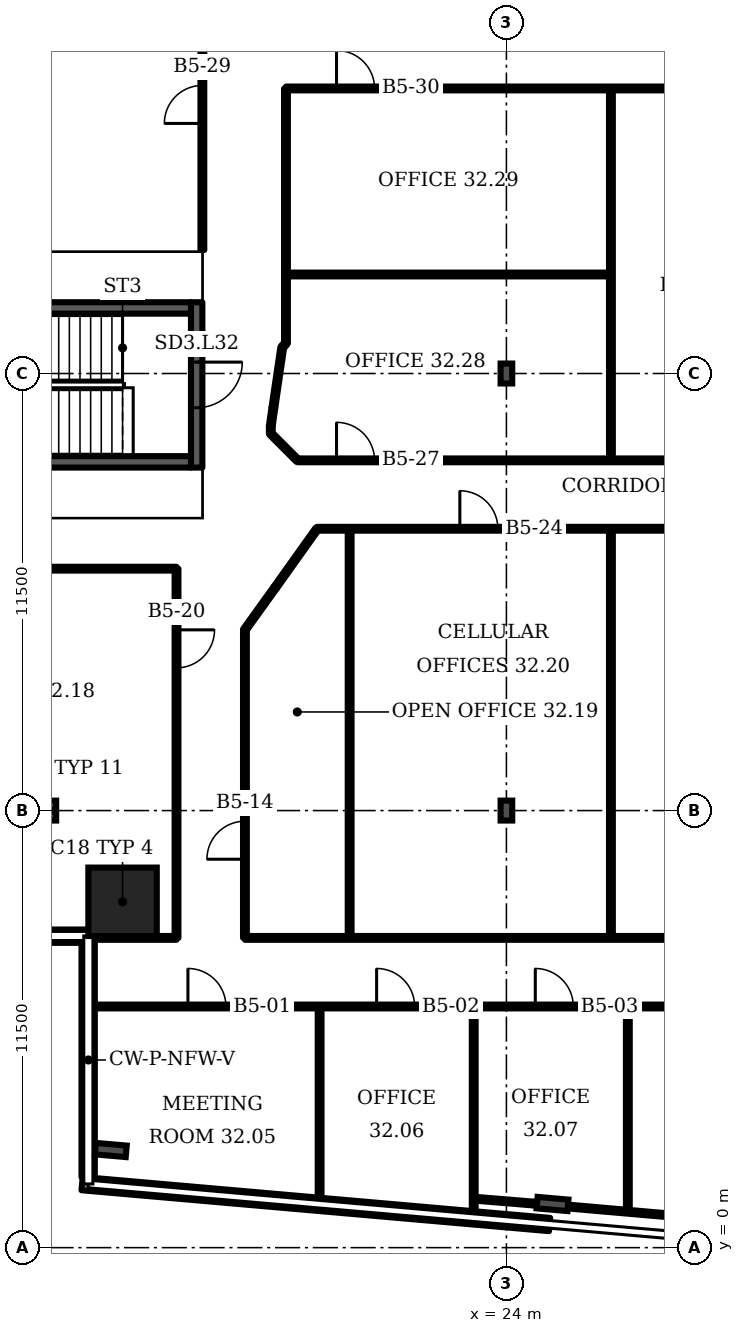
"""IFC4 building model, lengths in metres.
Left out: names, types, materials, properties, quantities, classifications, styles, units other than length and angle.
Written with IfcOpenShell. Run it as: python <this file> out.ifc"""

import sys

from ifc_helpers import new_model, si_unit, direction, frame, frame_2d, origin, origin_2d, place, context, subcontext, project, spatial, rectangle, i_section, extrude, element, fill, save


model = new_model("IFC4")
c1 = context("Model", 3, precision=1e-05, world=origin(), true_north=direction((0.0, 1.0)))
c2 = subcontext(c1, "Body", "Model", "MODEL_VIEW")
j1 = project(units=[si_unit("LENGTHUNIT", "METRE"), si_unit("PLANEANGLEUNIT", "RADIAN")], contexts=[c1])
p1 = place(None, origin())
s1 = spatial("IfcSite", under=j1, at=p1, CompositionType="ELEMENT")
p2 = place(p1, origin())
s2 = spatial("IfcBuilding", under=s1, at=p2, CompositionType="ELEMENT")
p3 = place(p2, frame((0.0, 0.0, 136.3)))
s3 = spatial("IfcBuildingStorey", under=s2, at=p3, CompositionType="ELEMENT", Elevation=136.3)
p4 = place(p3, frame((13.9, 9.1, 0.0), z_axis=(0.0, 0.0, 1.0), x_axis=(1.0, 0.0, 0.0)))
e1 = element("IfcColumn", 1, at=p4, inside=s3, PredefinedType="COLUMN", context=c2, shape_type="SweptSolid", body=[
    extrude(rectangle(XDim=1.8, YDim=1.8, at=origin_2d()), origin(), (0.0, 0.0, 1.0), 3.6),
])
for number, where, z_axis, x_axis in (
    (2, (13.591, 2.569, 0.0), (0.0, 0.0, 1.0), (-0.087, -0.996, 0.0)),
    (3, (25.214, 1.149, 0.0), (0.0, 0.0, 1.0), (-0.087, -0.996, 0.0)),
):
    element("IfcColumn", number, at=place(p3, frame(where, z_axis=z_axis, x_axis=x_axis)), inside=s3, PredefinedType="COLUMN", context=c2, shape_type="SweptSolid", body=[
        extrude(i_section(OverallWidth=0.303, OverallDepth=0.814, WebThickness=0.021, FlangeThickness=0.04, FilletRadius=0.03, at=origin_2d()), origin(), (0.0, 0.0, 1.0), 3.6),
    ])
for number, where, z_axis, x_axis in (
    (4, (12.0, 11.5, 0.0), (0.0, 0.0, 1.0), (1.0, 0.0, 0.0)),
    (5, (24.0, 11.5, 0.0), (0.0, 0.0, 1.0), (1.0, 0.0, 0.0)),
    (6, (24.0, 23.0, 0.0), (0.0, 0.0, 1.0), (1.0, 0.0, 0.0)),
):
    element("IfcColumn", number, at=place(p3, frame(where, z_axis=z_axis, x_axis=x_axis)), inside=s3, PredefinedType="COLUMN", context=c2, shape_type="SweptSolid", body=[
        extrude(i_section(OverallWidth=0.306, OverallDepth=0.524, WebThickness=0.021, FlangeThickness=0.04, FilletRadius=0.027, at=origin_2d()), origin(), (0.0, 0.0, 1.0), 3.6),
    ])
p5 = place(p3, frame((12.835, 1.685, 0.0), z_axis=(0.0, 0.0, 1.0), x_axis=(0.996192, -0.087173, 0.0)))
e7 = element("IfcWall", 7, at=p5, inside=s3, PredefinedType="SOLIDWALL", context=c2, shape_type="SweptSolid", body=[
    extrude(rectangle(XDim=12.348, YDim=0.35, at=frame_2d((6.174, 0.0))), origin(), (0.0, 0.0, 1.0), 1.0),
])
p6 = place(p3, frame((9.036, 8.195, 0.0), z_axis=(0.0, 0.0, 1.0), x_axis=(1.0, 0.0, 0.0)))
e8 = element("IfcWall", 8, at=p6, inside=s3, PredefinedType="SOLIDWALL", context=c2, shape_type="SweptSolid", body=[
    extrude(rectangle(XDim=3.964, YDim=0.35, at=frame_2d((1.982, 0.0))), origin(), (0.0, 0.0, 1.0), 1.0),
])
p7 = place(p3, frame((12.995, 8.02, 0.0), z_axis=(0.0, 0.0, 1.0), x_axis=(0.0, -1.0, 0.0)))
e9 = element("IfcWall", 9, at=p7, inside=s3, PredefinedType="SOLIDWALL", context=c2, shape_type="SweptSolid", body=[
    extrude(rectangle(XDim=6.161, YDim=0.35, at=frame_2d((3.081, 0.0))), origin(), (0.0, 0.0, 1.0), 1.0),
])
p8 = place(p3, frame((15.85, 20.525, 0.0), z_axis=(0.0, 0.0, 1.0), x_axis=(0.0, 1.0, 0.0)))
e10 = element("IfcWall", 10, at=p8, inside=s3, PredefinedType="SHEAR", context=c2, shape_type="SweptSolid", body=[
    extrude(rectangle(XDim=4.35, YDim=0.3, at=frame_2d((2.175, 0.0))), origin(), (0.0, 0.0, 1.0), 3.2),
])
p9 = place(p8, frame((1.575, 0.0, 0.0)))
e11 = element("IfcOpeningElement", 11, at=p9, cuts=e10, PredefinedType="OPENING", context=c2, shape_type="SweptSolid", body=[
    extrude(rectangle(XDim=1.2, YDim=2.1, at=frame_2d((0.6, 1.05))), frame((0.0, 0.16, 0.0), z_axis=(0.0, -1.0, 0.0), x_axis=(1.0, 0.0, 0.0)), (0.0, 0.0, 1.0), 0.32),
])
p10 = place(p3, frame((7.51, 17.865, 0.0), z_axis=(0.0, 0.0, 1.0), x_axis=(1.0, 0.0, 0.0)))
e12 = element("IfcWall", 12, at=p10, inside=s3, PredefinedType="PARTITIONING", context=c2, shape_type="SweptSolid", body=[
    extrude(rectangle(XDim=7.81, YDim=0.1, at=frame_2d((3.905, 0.0))), origin(), (0.0, 0.0, 1.0), 3.2),
])
p11 = place(p3, frame((13.02, 6.345, 0.0), z_axis=(0.0, 0.0, 1.0), x_axis=(1.0, 0.0, 0.0)))
e13 = element("IfcWall", 13, at=p11, inside=s3, PredefinedType="PARTITIONING", context=c2, shape_type="SweptSolid", body=[
    extrude(rectangle(XDim=28.165, YDim=0.1, at=frame_2d((14.083, 0.0))), origin(), (0.0, 0.0, 1.0), 3.2),
])
p12 = place(p11, frame((2.6, 0.0, 0.0)))
e14 = element("IfcOpeningElement", 14, at=p12, cuts=e13, PredefinedType="OPENING", context=c2, shape_type="SweptSolid", body=[
    extrude(rectangle(XDim=1.0, YDim=2.1, at=frame_2d((0.5, 1.05))), frame((0.0, 0.06, 0.0), z_axis=(0.0, -1.0, 0.0), x_axis=(1.0, 0.0, 0.0)), (0.0, 0.0, 1.0), 0.12),
])
p13 = place(p11, frame((7.565, 0.0, 0.0)))
e15 = element("IfcOpeningElement", 15, at=p13, cuts=e13, PredefinedType="OPENING", context=c2, shape_type="SweptSolid", body=[
    extrude(rectangle(XDim=1.0, YDim=2.1, at=frame_2d((0.5, 1.05))), frame((0.0, 0.06, 0.0), z_axis=(0.0, -1.0, 0.0), x_axis=(1.0, 0.0, 0.0)), (0.0, 0.0, 1.0), 0.12),
])
p14 = place(p11, frame((11.74, 0.0, 0.0)))
e16 = element("IfcOpeningElement", 16, at=p14, cuts=e13, PredefinedType="OPENING", context=c2, shape_type="SweptSolid", body=[
    extrude(rectangle(XDim=1.0, YDim=2.1, at=frame_2d((0.5, 1.05))), frame((0.0, 0.06, 0.0), z_axis=(0.0, -1.0, 0.0), x_axis=(1.0, 0.0, 0.0)), (0.0, 0.0, 1.0), 0.12),
])
p15 = place(p11, frame((15.795, 0.0, 0.0)))
e17 = element("IfcOpeningElement", 17, at=p15, cuts=e13, PredefinedType="OPENING", context=c2, shape_type="SweptSolid", body=[
    extrude(rectangle(XDim=1.0, YDim=2.1, at=frame_2d((0.5, 1.05))), frame((0.0, 0.06, 0.0), z_axis=(0.0, -1.0, 0.0), x_axis=(1.0, 0.0, 0.0)), (0.0, 0.0, 1.0), 0.12),
])
p16 = place(p11, frame((19.65, 0.0, 0.0)))
e18 = element("IfcOpeningElement", 18, at=p16, cuts=e13, PredefinedType="OPENING", context=c2, shape_type="SweptSolid", body=[
    extrude(rectangle(XDim=1.0, YDim=2.1, at=frame_2d((0.5, 1.05))), frame((0.0, 0.06, 0.0), z_axis=(0.0, -1.0, 0.0), x_axis=(1.0, 0.0, 0.0)), (0.0, 0.0, 1.0), 0.12),
])
p17 = place(p11, frame((23.43, 0.0, 0.0)))
e19 = element("IfcOpeningElement", 19, at=p17, cuts=e13, PredefinedType="OPENING", context=c2, shape_type="SweptSolid", body=[
    extrude(rectangle(XDim=1.0, YDim=2.1, at=frame_2d((0.5, 1.05))), frame((0.0, 0.06, 0.0), z_axis=(0.0, -1.0, 0.0), x_axis=(1.0, 0.0, 0.0)), (0.0, 0.0, 1.0), 0.12),
])
p18 = place(p3, frame((13.02, 8.15, 0.0), z_axis=(0.0, 0.0, 1.0), x_axis=(1.0, 0.0, 0.0)))
e20 = element("IfcWall", 20, at=p18, inside=s3, PredefinedType="PARTITIONING", context=c2, shape_type="SweptSolid", body=[
    extrude(rectangle(XDim=2.3, YDim=0.1, at=frame_2d((1.15, 0.0))), origin(), (0.0, 0.0, 1.0), 3.2),
])
p19 = place(p3, frame((15.32, 8.15, 0.0), z_axis=(0.0, 0.0, 1.0), x_axis=(0.0, 1.0, 0.0)))
e21 = element("IfcWall", 21, at=p19, inside=s3, PredefinedType="PARTITIONING", context=c2, shape_type="SweptSolid", body=[
    extrude(rectangle(XDim=9.715, YDim=0.1, at=frame_2d((4.857, 0.0))), origin(), (0.0, 0.0, 1.0), 3.2),
])
p20 = place(p19, frame((7.105, 0.0, 0.0)))
e22 = element("IfcOpeningElement", 22, at=p20, cuts=e21, PredefinedType="OPENING", context=c2, shape_type="SweptSolid", body=[
    extrude(rectangle(XDim=1.0, YDim=2.1, at=frame_2d((0.5, 1.05))), frame((0.0, 0.06, 0.0), z_axis=(0.0, -1.0, 0.0), x_axis=(1.0, 0.0, 0.0)), (0.0, 0.0, 1.0), 0.12),
])
p21 = place(p3, frame((16.0, 26.25, 0.0), z_axis=(0.0, 0.0, 1.0), x_axis=(0.0, 1.0, 0.0)))
e23 = element("IfcWall", 23, at=p21, inside=s3, PredefinedType="PARTITIONING", context=c2, shape_type="SweptSolid", body=[
    extrude(rectangle(XDim=7.73, YDim=0.1, at=frame_2d((3.865, 0.0))), origin(), (0.0, 0.0, 1.0), 3.2),
])
p22 = place(p21, frame((3.33, 0.0, 0.0)))
e24 = element("IfcOpeningElement", 24, at=p22, cuts=e23, PredefinedType="OPENING", context=c2, shape_type="SweptSolid", body=[
    extrude(rectangle(XDim=1.0, YDim=2.1, at=frame_2d((0.5, 1.05))), frame((0.0, 0.06, 0.0), z_axis=(0.0, -1.0, 0.0), x_axis=(1.0, 0.0, 0.0)), (0.0, 0.0, 1.0), 0.12),
])
p23 = place(p3, frame((17.12, 8.15, 0.0), z_axis=(0.0, 0.0, 1.0), x_axis=(0.0, 1.0, 0.0)))
e25 = element("IfcWall", 25, at=p23, inside=s3, PredefinedType="PARTITIONING", context=c2, shape_type="SweptSolid", body=[
    extrude(rectangle(XDim=8.11, YDim=0.1, at=frame_2d((4.055, 0.0))), origin(), (0.0, 0.0, 1.0), 3.2),
])
p24 = place(p23, frame((2.07, 0.0, 0.0)))
e26 = element("IfcOpeningElement", 26, at=p24, cuts=e25, PredefinedType="OPENING", context=c2, shape_type="SweptSolid", body=[
    extrude(rectangle(XDim=1.0, YDim=2.1, at=frame_2d((0.5, 1.05))), frame((0.0, 0.06, 0.0), z_axis=(0.0, -1.0, 0.0), x_axis=(1.0, 0.0, 0.0)), (0.0, 0.0, 1.0), 0.12),
])
p25 = place(p3, frame((17.12, 8.15, 0.0), z_axis=(0.0, 0.0, 1.0), x_axis=(1.0, 0.0, 0.0)))
e27 = element("IfcWall", 27, at=p25, inside=s3, PredefinedType="PARTITIONING", context=c2, shape_type="SweptSolid", body=[
    extrude(rectangle(XDim=24.065, YDim=0.1, at=frame_2d((12.033, 0.0))), origin(), (0.0, 0.0, 1.0), 3.2),
])
p26 = place(p3, frame((17.12, 16.26, 0.0), z_axis=(0.0, 0.0, 1.0), x_axis=(0.583811, 0.811893, 0.0)))
e28 = element("IfcWall", 28, at=p26, inside=s3, PredefinedType="PARTITIONING", context=c2, shape_type="SweptSolid", body=[
    extrude(rectangle(XDim=1.364, YDim=0.1, at=frame_2d((0.682, 0.0))), origin(), (0.0, 0.0, 1.0), 3.2),
])
p27 = place(p3, frame((17.8, 21.42, 0.0), z_axis=(0.0, 0.0, 1.0), x_axis=(0.0, 1.0, 0.0)))
e29 = element("IfcWall", 29, at=p27, inside=s3, PredefinedType="PARTITIONING", context=c2, shape_type="SweptSolid", body=[
    extrude(rectangle(XDim=0.2, YDim=0.1, at=frame_2d((0.1, 0.0))), origin(), (0.0, 0.0, 1.0), 3.2),
])
p28 = place(p3, frame((17.8, 21.62, 0.0), z_axis=(0.0, 0.0, 1.0), x_axis=(0.141559, 0.989927, 0.0)))
e30 = element("IfcWall", 30, at=p28, inside=s3, PredefinedType="PARTITIONING", context=c2, shape_type="SweptSolid", body=[
    extrude(rectangle(XDim=0.495, YDim=0.1, at=frame_2d((0.248, 0.0))), origin(), (0.0, 0.0, 1.0), 3.2),
])
p29 = place(p3, frame((17.87, 22.11, 0.0), z_axis=(0.0, 0.0, 1.0), x_axis=(0.145396, 0.989372, 0.0)))
e31 = element("IfcWall", 31, at=p29, inside=s3, PredefinedType="PARTITIONING", context=c2, shape_type="SweptSolid", body=[
    extrude(rectangle(XDim=1.582, YDim=0.1, at=frame_2d((0.791, 0.0))), origin(), (0.0, 0.0, 1.0), 3.2),
])
p30 = place(p3, frame((17.915, 17.365, 0.0), z_axis=(0.0, 0.0, 1.0), x_axis=(0.580403, 0.814333, 0.0)))
e32 = element("IfcWall", 32, at=p30, inside=s3, PredefinedType="PARTITIONING", context=c2, shape_type="SweptSolid", body=[
    extrude(rectangle(XDim=1.905, YDim=0.1, at=frame_2d((0.952, 0.0))), origin(), (0.0, 0.0, 1.0), 3.2),
])
p31 = place(p3, frame((18.1, 23.685, 0.0), z_axis=(0.0, 0.0, 1.0), x_axis=(0.65566, 0.755051, 0.0)))
e33 = element("IfcWall", 33, at=p31, inside=s3, PredefinedType="PARTITIONING", context=c2, shape_type="SweptSolid", body=[
    extrude(rectangle(XDim=0.152, YDim=0.1, at=frame_2d((0.076, 0.0))), origin(), (0.0, 0.0, 1.0), 3.2),
])
p32 = place(p3, frame((18.2, 23.8, 0.0), z_axis=(0.0, 0.0, 1.0), x_axis=(0.0, 1.0, 0.0)))
e34 = element("IfcWall", 34, at=p32, inside=s3, PredefinedType="PARTITIONING", context=c2, shape_type="SweptSolid", body=[
    extrude(rectangle(XDim=6.7, YDim=0.1, at=frame_2d((3.35, 0.0))), origin(), (0.0, 0.0, 1.0), 3.2),
])
p33 = place(p3, frame((18.2, 25.605, 0.0), z_axis=(0.0, 0.0, 1.0), x_axis=(1.0, 0.0, 0.0)))
e35 = element("IfcWall", 35, at=p33, inside=s3, PredefinedType="PARTITIONING", context=c2, shape_type="SweptSolid", body=[
    extrude(rectangle(XDim=8.55, YDim=0.1, at=frame_2d((4.275, 0.0))), origin(), (0.0, 0.0, 1.0), 3.2),
])
p34 = place(p3, frame((18.2, 30.5, 0.0), z_axis=(0.0, 0.0, 1.0), x_axis=(1.0, 0.0, 0.0)))
e36 = element("IfcWall", 36, at=p34, inside=s3, PredefinedType="PARTITIONING", context=c2, shape_type="SweptSolid", body=[
    extrude(rectangle(XDim=18.65, YDim=0.1, at=frame_2d((9.325, 0.0))), origin(), (0.0, 0.0, 1.0), 3.2),
])
p35 = place(p34, frame((1.33, 0.0, 0.0)))
e37 = element("IfcOpeningElement", 37, at=p35, cuts=e36, PredefinedType="OPENING", context=c2, shape_type="SweptSolid", body=[
    extrude(rectangle(XDim=1.0, YDim=2.1, at=frame_2d((0.5, 1.05))), frame((0.0, 0.06, 0.0), z_axis=(0.0, -1.0, 0.0), x_axis=(1.0, 0.0, 0.0)), (0.0, 0.0, 1.0), 0.12),
])
p36 = place(p34, frame((13.17, 0.0, 0.0)))
e38 = element("IfcOpeningElement", 38, at=p36, cuts=e36, PredefinedType="OPENING", context=c2, shape_type="SweptSolid", body=[
    extrude(rectangle(XDim=1.0, YDim=2.1, at=frame_2d((0.5, 1.05))), frame((0.0, 0.06, 0.0), z_axis=(0.0, -1.0, 0.0), x_axis=(1.0, 0.0, 0.0)), (0.0, 0.0, 1.0), 0.12),
])
p37 = place(p3, frame((18.505, 20.715, 0.0), z_axis=(0.0, 0.0, 1.0), x_axis=(-0.707107, 0.707107, 0.0)))
e39 = element("IfcWall", 39, at=p37, inside=s3, PredefinedType="PARTITIONING", context=c2, shape_type="SweptSolid", body=[
    extrude(rectangle(XDim=0.997, YDim=0.1, at=frame_2d((0.499, 0.0))), origin(), (0.0, 0.0, 1.0), 3.2),
])
p38 = place(p3, frame((18.505, 20.715, 0.0), z_axis=(0.0, 0.0, 1.0), x_axis=(1.0, 0.0, 0.0)))
e40 = element("IfcWall", 40, at=p38, inside=s3, PredefinedType="PARTITIONING", context=c2, shape_type="SweptSolid", body=[
    extrude(rectangle(XDim=49.385, YDim=0.1, at=frame_2d((24.692, 0.0))), origin(), (0.0, 0.0, 1.0), 3.2),
])
p39 = place(p38, frame((1.025, 0.0, 0.0)))
e41 = element("IfcOpeningElement", 41, at=p39, cuts=e40, PredefinedType="OPENING", context=c2, shape_type="SweptSolid", body=[
    extrude(rectangle(XDim=1.0, YDim=2.1, at=frame_2d((0.5, 1.05))), frame((0.0, 0.06, 0.0), z_axis=(0.0, -1.0, 0.0), x_axis=(1.0, 0.0, 0.0)), (0.0, 0.0, 1.0), 0.12),
])
p40 = place(p3, frame((19.02, 18.915, 0.0), z_axis=(0.0, 0.0, 1.0), x_axis=(1.0, 0.0, 0.0)))
e42 = element("IfcWall", 42, at=p40, inside=s3, PredefinedType="PARTITIONING", context=c2, shape_type="SweptSolid", body=[
    extrude(rectangle(XDim=22.965, YDim=0.1, at=frame_2d((11.482, 0.0))), origin(), (0.0, 0.0, 1.0), 3.2),
])
p41 = place(p40, frame((3.755, 0.0, 0.0)))
e43 = element("IfcOpeningElement", 43, at=p41, cuts=e42, PredefinedType="OPENING", context=c2, shape_type="SweptSolid", body=[
    extrude(rectangle(XDim=1.0, YDim=2.1, at=frame_2d((0.5, 1.05))), frame((0.0, 0.06, 0.0), z_axis=(0.0, -1.0, 0.0), x_axis=(1.0, 0.0, 0.0)), (0.0, 0.0, 1.0), 0.12),
])
p42 = place(p40, frame((18.95, 0.0, 0.0)))
e44 = element("IfcOpeningElement", 44, at=p42, cuts=e42, PredefinedType="OPENING", context=c2, shape_type="SweptSolid", body=[
    extrude(rectangle(XDim=1.8, YDim=2.1, at=frame_2d((0.9, 1.05))), frame((0.0, 0.06, 0.0), z_axis=(0.0, -1.0, 0.0), x_axis=(1.0, 0.0, 0.0)), (0.0, 0.0, 1.0), 0.12),
])
p43 = place(p3, frame((19.085, 1.163, 0.0), z_axis=(0.0, 0.0, 1.0), x_axis=(0.0, 1.0, 0.0)))
e45 = element("IfcWall", 45, at=p43, inside=s3, PredefinedType="PARTITIONING", context=c2, shape_type="SweptSolid", body=[
    extrude(rectangle(XDim=5.182, YDim=0.1, at=frame_2d((2.591, 0.0))), origin(), (0.0, 0.0, 1.0), 2.58),
])
p44 = place(p3, frame((19.875, 8.15, 0.0), z_axis=(0.0, 0.0, 1.0), x_axis=(0.0, 1.0, 0.0)))
e46 = element("IfcWall", 46, at=p44, inside=s3, PredefinedType="PARTITIONING", context=c2, shape_type="SweptSolid", body=[
    extrude(rectangle(XDim=10.765, YDim=0.1, at=frame_2d((5.383, 0.0))), origin(), (0.0, 0.0, 1.0), 3.2),
])
p45 = place(p3, frame((23.14, 0.825, 0.0), z_axis=(0.0, 0.0, 1.0), x_axis=(0.0, 1.0, 0.0)))
e47 = element("IfcWall", 47, at=p45, inside=s3, PredefinedType="PARTITIONING", context=c2, shape_type="SweptSolid", body=[
    extrude(rectangle(XDim=5.52, YDim=0.1, at=frame_2d((2.76, 0.0))), origin(), (0.0, 0.0, 1.0), 2.58),
])
p46 = place(p3, frame((24.715, 1.16, 0.0), z_axis=(0.0, 0.0, 1.0), x_axis=(-0.996654, 0.081685, 0.0)))
e48 = element("IfcWall", 48, at=p46, inside=s3, PredefinedType="PARTITIONING", context=c2, shape_type="SweptSolid", body=[
    extrude(rectangle(XDim=1.53, YDim=0.1, at=frame_2d((0.765, 0.0))), origin(), (0.0, 0.0, 1.0), 2.58),
])
p47 = place(p3, frame((26.75, 8.15, 0.0), z_axis=(0.0, 0.0, 1.0), x_axis=(0.0, 1.0, 0.0)))
e49 = element("IfcWall", 49, at=p47, inside=s3, PredefinedType="PARTITIONING", context=c2, shape_type="SweptSolid", body=[
    extrude(rectangle(XDim=10.765, YDim=0.1, at=frame_2d((5.383, 0.0))), origin(), (0.0, 0.0, 1.0), 3.2),
])
p48 = place(p3, frame((26.75, 20.715, 0.0), z_axis=(0.0, 0.0, 1.0), x_axis=(0.0, 1.0, 0.0)))
e50 = element("IfcWall", 50, at=p48, inside=s3, PredefinedType="PARTITIONING", context=c2, shape_type="SweptSolid", body=[
    extrude(rectangle(XDim=9.785, YDim=0.1, at=frame_2d((4.893, 0.0))), origin(), (0.0, 0.0, 1.0), 3.2),
])
p49 = place(p3, frame((27.195, 0.945, 0.0), z_axis=(0.0, 0.0, 1.0), x_axis=(0.0, 1.0, 0.0)))
e51 = element("IfcWall", 51, at=p49, inside=s3, PredefinedType="PARTITIONING", context=c2, shape_type="SweptSolid", body=[
    extrude(rectangle(XDim=5.4, YDim=0.1, at=frame_2d((2.7, 0.0))), origin(), (0.0, 0.0, 1.0), 3.2),
])
p50 = place(p3, frame((35.03, 0.26, 0.0), z_axis=(0.0, 0.0, 1.0), x_axis=(-0.996214, 0.086976, 0.0)))
e52 = element("IfcWall", 52, at=p50, inside=s3, PredefinedType="PARTITIONING", context=c2, shape_type="SweptSolid", body=[
    extrude(rectangle(XDim=10.352, YDim=0.1, at=frame_2d((5.176, 0.0))), origin(), (0.0, 0.0, 1.0), 2.58),
])
for number, where, z_axis, x_axis in (
    (53, (8.2, 20.675, 0.0), (0.0, 0.0, 1.0), (1.0, 0.0, 0.0)),
    (54, (8.2, 24.725, 0.0), (0.0, 0.0, 1.0), (1.0, 0.0, 0.0)),
):
    element("IfcWall", number, at=place(p3, frame(where, z_axis=z_axis, x_axis=x_axis)), inside=s3, PredefinedType="SHEAR", context=c2, shape_type="SweptSolid", body=[
        extrude(rectangle(XDim=7.5, YDim=0.3, at=frame_2d((3.75, 0.0))), origin(), (0.0, 0.0, 1.0), 3.2),
    ])
p51 = place(p9, origin())
e55 = element("IfcDoor", 55, at=p51, inside=s3, OperationType="SINGLE_SWING_RIGHT", PredefinedType="DOOR", context=c2, shape_type="SweptSolid", body=[
    extrude(rectangle(XDim=1.2, YDim=2.1, at=frame_2d((0.6, 1.05))), frame((0.0, 0.025, 0.0), z_axis=(0.0, -1.0, 0.0), x_axis=(1.0, 0.0, 0.0)), (0.0, 0.0, 1.0), 0.05),
])
fill(e11, e55)
p52 = place(p12, origin())
e56 = element("IfcDoor", 56, at=p52, inside=s3, OperationType="SINGLE_SWING_LEFT", PredefinedType="DOOR", context=c2, shape_type="SweptSolid", body=[
    extrude(rectangle(XDim=1.0, YDim=2.1, at=frame_2d((0.5, 1.05))), frame((0.0, 0.025, 0.0), z_axis=(0.0, -1.0, 0.0), x_axis=(1.0, 0.0, 0.0)), (0.0, 0.0, 1.0), 0.05),
])
fill(e14, e56)
p53 = place(p13, origin())
e57 = element("IfcDoor", 57, at=p53, inside=s3, OperationType="SINGLE_SWING_LEFT", PredefinedType="DOOR", context=c2, shape_type="SweptSolid", body=[
    extrude(rectangle(XDim=1.0, YDim=2.1, at=frame_2d((0.5, 1.05))), frame((0.0, 0.025, 0.0), z_axis=(0.0, -1.0, 0.0), x_axis=(1.0, 0.0, 0.0)), (0.0, 0.0, 1.0), 0.05),
])
fill(e15, e57)
p54 = place(p14, origin())
e58 = element("IfcDoor", 58, at=p54, inside=s3, OperationType="SINGLE_SWING_LEFT", PredefinedType="DOOR", context=c2, shape_type="SweptSolid", body=[
    extrude(rectangle(XDim=1.0, YDim=2.1, at=frame_2d((0.5, 1.05))), frame((0.0, 0.025, 0.0), z_axis=(0.0, -1.0, 0.0), x_axis=(1.0, 0.0, 0.0)), (0.0, 0.0, 1.0), 0.05),
])
fill(e16, e58)
p55 = place(p24, origin())
e59 = element("IfcDoor", 59, at=p55, inside=s3, OperationType="SINGLE_SWING_LEFT", PredefinedType="DOOR", context=c2, shape_type="SweptSolid", body=[
    extrude(rectangle(XDim=1.0, YDim=2.1, at=frame_2d((0.5, 1.05))), frame((0.0, 0.025, 0.0), z_axis=(0.0, -1.0, 0.0), x_axis=(1.0, 0.0, 0.0)), (0.0, 0.0, 1.0), 0.05),
])
fill(e26, e59)
p56 = place(p20, origin())
e60 = element("IfcDoor", 60, at=p56, inside=s3, OperationType="SINGLE_SWING_RIGHT", PredefinedType="DOOR", context=c2, shape_type="SweptSolid", body=[
    extrude(rectangle(XDim=1.0, YDim=2.1, at=frame_2d((0.5, 1.05))), frame((0.0, 0.025, 0.0), z_axis=(0.0, -1.0, 0.0), x_axis=(1.0, 0.0, 0.0)), (0.0, 0.0, 1.0), 0.05),
])
fill(e22, e60)
p57 = place(p41, origin())
e61 = element("IfcDoor", 61, at=p57, inside=s3, OperationType="SINGLE_SWING_LEFT", PredefinedType="DOOR", context=c2, shape_type="SweptSolid", body=[
    extrude(rectangle(XDim=1.0, YDim=2.1, at=frame_2d((0.5, 1.05))), frame((0.0, 0.025, 0.0), z_axis=(0.0, -1.0, 0.0), x_axis=(1.0, 0.0, 0.0)), (0.0, 0.0, 1.0), 0.05),
])
fill(e43, e61)
p58 = place(p39, origin())
e62 = element("IfcDoor", 62, at=p58, inside=s3, OperationType="SINGLE_SWING_LEFT", PredefinedType="DOOR", context=c2, shape_type="SweptSolid", body=[
    extrude(rectangle(XDim=1.0, YDim=2.1, at=frame_2d((0.5, 1.05))), frame((0.0, 0.025, 0.0), z_axis=(0.0, -1.0, 0.0), x_axis=(1.0, 0.0, 0.0)), (0.0, 0.0, 1.0), 0.05),
])
fill(e41, e62)
p59 = place(p22, origin())
e63 = element("IfcDoor", 63, at=p59, inside=s3, OperationType="SINGLE_SWING_LEFT", PredefinedType="DOOR", context=c2, shape_type="SweptSolid", body=[
    extrude(rectangle(XDim=1.0, YDim=2.1, at=frame_2d((0.5, 1.05))), frame((0.0, 0.025, 0.0), z_axis=(0.0, -1.0, 0.0), x_axis=(1.0, 0.0, 0.0)), (0.0, 0.0, 1.0), 0.05),
])
fill(e24, e63)
p60 = place(p35, origin())
e64 = element("IfcDoor", 64, at=p60, inside=s3, OperationType="SINGLE_SWING_LEFT", PredefinedType="DOOR", context=c2, shape_type="SweptSolid", body=[
    extrude(rectangle(XDim=1.0, YDim=2.1, at=frame_2d((0.5, 1.05))), frame((0.0, 0.025, 0.0), z_axis=(0.0, -1.0, 0.0), x_axis=(1.0, 0.0, 0.0)), (0.0, 0.0, 1.0), 0.05),
])
fill(e37, e64)
save(model, sys.argv[1])
